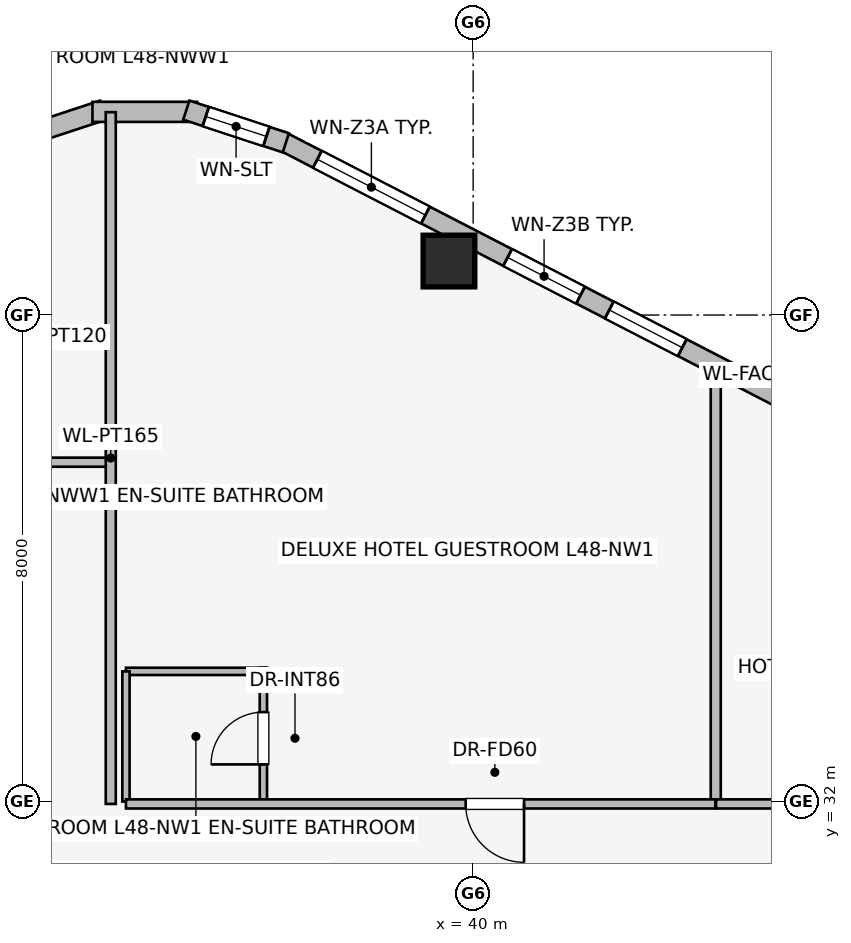
"""IFC4 building model, lengths in metres.
Left out: names, types, materials, properties, quantities, classifications, styles, units other than length and angle.
Written with IfcOpenShell. Run it as: python <this file> out.ifc"""

import sys

from ifc_helpers import new_model, si_unit, direction, frame, frame_2d, origin, origin_2d, place, context, subcontext, project, spatial, rectangle, extrude, element, fill, save


model = new_model("IFC4")
c1 = context("Model", 3, precision=1e-05, world=origin(), true_north=direction((0.0, 1.0)))
c2 = subcontext(c1, "Body", "Model", "MODEL_VIEW")
j1 = project(units=[si_unit("LENGTHUNIT", "METRE"), si_unit("PLANEANGLEUNIT", "RADIAN")], contexts=[c1])
p1 = place(None, origin())
s1 = spatial("IfcSite", under=j1, at=p1, CompositionType="ELEMENT")
p2 = place(p1, origin())
s2 = spatial("IfcBuilding", under=s1, at=p2, CompositionType="ELEMENT")
p3 = place(p2, frame((0.0, 0.0, 177.45)))
s3 = spatial("IfcBuildingStorey", under=s2, at=p3, CompositionType="ELEMENT", Elevation=177.45)
p4 = place(p3, frame((39.602, 40.888, 0.0), z_axis=(0.0, 0.0, 1.0), x_axis=(1.0, 0.0, 0.0)))
e1 = element("IfcColumn", 1, at=p4, inside=s3, PredefinedType="COLUMN", context=c2, shape_type="SweptSolid", body=[
    extrude(rectangle(XDim=0.85, YDim=0.85, at=origin_2d()), origin(), (0.0, 0.0, 1.0), 3.45),
])
p5 = place(p3, frame((36.838, 42.871, 0.0), z_axis=(0.0, 0.0, 1.0), x_axis=(0.888626188278, -0.458632202867, 0.0)))
e2 = element("IfcWall", 2, at=p5, inside=s3, PredefinedType="STANDARD", context=c2, shape_type="SweptSolid", body=[
    extrude(rectangle(XDim=16.828, YDim=0.31, at=frame_2d((8.414, 0.0))), origin(), (0.0, 0.0, 1.0), 3.16),
])
p6 = place(p5, frame((0.675, 0.0, 0.75)))
e3 = element("IfcOpeningElement", 3, at=p6, cuts=e2, PredefinedType="OPENING", context=c2, shape_type="SweptSolid", body=[
    extrude(rectangle(XDim=2.0, YDim=1.5, at=frame_2d((1.0, 0.75))), frame((0.0, 0.165, 0.0), z_axis=(0.0, -1.0, 0.0), x_axis=(1.0, 0.0, 0.0)), (0.0, 0.0, 1.0), 0.33),
])
p7 = place(p5, frame((4.196, 0.0, 0.75)))
e4 = element("IfcOpeningElement", 4, at=p7, cuts=e2, PredefinedType="OPENING", context=c2, shape_type="SweptSolid", body=[
    extrude(rectangle(XDim=1.35, YDim=1.45, at=frame_2d((0.675, 0.725))), frame((0.0, 0.165, 0.0), z_axis=(0.0, -1.0, 0.0), x_axis=(1.0, 0.0, 0.0)), (0.0, 0.0, 1.0), 0.33),
])
p8 = place(p5, frame((6.078, 0.0, 0.75)))
e5 = element("IfcOpeningElement", 5, at=p8, cuts=e2, PredefinedType="OPENING", context=c2, shape_type="SweptSolid", body=[
    extrude(rectangle(XDim=1.35, YDim=1.45, at=frame_2d((0.675, 0.725))), frame((0.0, 0.165, 0.0), z_axis=(0.0, -1.0, 0.0), x_axis=(1.0, 0.0, 0.0)), (0.0, 0.0, 1.0), 0.33),
])
p9 = place(p5, frame((9.658, 0.0, 0.75)))
e6 = element("IfcOpeningElement", 6, at=p9, cuts=e2, PredefinedType="OPENING", context=c2, shape_type="SweptSolid", body=[
    extrude(rectangle(XDim=2.0, YDim=1.5, at=frame_2d((1.0, 0.75))), frame((0.0, 0.165, 0.0), z_axis=(0.0, -1.0, 0.0), x_axis=(1.0, 0.0, 0.0)), (0.0, 0.0, 1.0), 0.33),
])
p10 = place(p5, frame((14.478, 0.0, 0.75)))
e7 = element("IfcOpeningElement", 7, at=p10, cuts=e2, PredefinedType="OPENING", context=c2, shape_type="SweptSolid", body=[
    extrude(rectangle(XDim=1.35, YDim=1.45, at=frame_2d((0.675, 0.725))), frame((0.0, 0.165, 0.0), z_axis=(0.0, -1.0, 0.0), x_axis=(1.0, 0.0, 0.0)), (0.0, 0.0, 1.0), 0.33),
])
p11 = place(p3, frame((32.281, 42.832, 0.0), z_axis=(0.0, 0.0, 1.0), x_axis=(0.949937416267, 0.312440242569, 0.0)))
e8 = element("IfcWall", 8, at=p11, inside=s3, PredefinedType="STANDARD", context=c2, shape_type="SweptSolid", body=[
    extrude(rectangle(XDim=1.722, YDim=0.33, at=frame_2d((0.861, 0.0))), origin(), (0.0, 0.0, 1.0), 3.16),
])
p12 = place(p3, frame((33.739, 43.341, 0.0), z_axis=(0.0, 0.0, 1.0), x_axis=(1.0, 0.0, 0.0)))
e9 = element("IfcWall", 9, at=p12, inside=s3, PredefinedType="STANDARD", context=c2, shape_type="SweptSolid", body=[
    extrude(rectangle(XDim=1.722, YDim=0.33, at=frame_2d((0.861, 0.0))), origin(), (0.0, 0.0, 1.0), 3.16),
])
p13 = place(p3, frame((35.283, 43.37, 0.0), z_axis=(0.0, 0.0, 1.0), x_axis=(0.949937416267, -0.312440242569, 0.0)))
e10 = element("IfcWall", 10, at=p13, inside=s3, PredefinedType="STANDARD", context=c2, shape_type="SweptSolid", body=[
    extrude(rectangle(XDim=1.722, YDim=0.33, at=frame_2d((0.861, 0.0))), origin(), (0.0, 0.0, 1.0), 3.16),
])
p14 = place(p13, frame((0.336, 0.0, 0.75)))
e11 = element("IfcOpeningElement", 11, at=p14, cuts=e10, PredefinedType="OPENING", context=c2, shape_type="SweptSolid", body=[
    extrude(rectangle(XDim=1.05, YDim=1.4, at=frame_2d((0.525, 0.7))), frame((0.0, 0.175, 0.0), z_axis=(0.0, -1.0, 0.0), x_axis=(1.0, 0.0, 0.0)), (0.0, 0.0, 1.0), 0.35),
])
p15 = place(p3, frame((34.0, 39.64, 0.0), z_axis=(0.0, 0.0, 1.0), x_axis=(-1.0, 0.0, 0.0)))
e12 = element("IfcWall", 12, at=p15, inside=s3, PredefinedType="PARTITIONING", context=c2, shape_type="SweptSolid", body=[
    extrude(rectangle(XDim=2.34, YDim=0.12, at=frame_2d((1.17, 0.0))), origin(), (0.0, 0.0, 1.0), 3.16),
])
p16 = place(p3, frame((34.0, 37.58, 0.0), z_axis=(0.0, 0.0, 1.0), x_axis=(-1.0, 0.0, 0.0)))
e13 = element("IfcWall", 13, at=p16, inside=s3, PredefinedType="PARTITIONING", context=c2, shape_type="SweptSolid", body=[
    extrude(rectangle(XDim=12.075, YDim=0.15, at=frame_2d((6.038, 0.0))), origin(), (0.0, 0.0, 1.0), 3.16),
])
p17 = place(p16, frame((4.96, 0.0, 0.0)))
e14 = element("IfcOpeningElement", 14, at=p17, cuts=e13, PredefinedType="OPENING", context=c2, shape_type="SweptSolid", body=[
    extrude(rectangle(XDim=0.96, YDim=2.0, at=frame_2d((0.48, 1.0))), frame((0.0, 0.085, 0.0), z_axis=(0.0, -1.0, 0.0), x_axis=(1.0, 0.0, 0.0)), (0.0, 0.0, 1.0), 0.17),
])
p18 = place(p3, frame((34.04, 31.96, 0.0), z_axis=(0.0, 0.0, 1.0), x_axis=(0.0, 1.0, 0.0)))
e15 = element("IfcWall", 15, at=p18, inside=s3, PredefinedType="PARTITIONING", context=c2, shape_type="SweptSolid", body=[
    extrude(rectangle(XDim=11.376, YDim=0.165, at=frame_2d((5.688, 0.0))), origin(), (0.0, 0.0, 1.0), 3.16),
])
p19 = place(p3, frame((43.99, 31.97, 0.0), z_axis=(0.0, 0.0, 1.0), x_axis=(0.0, 1.0, 0.0)))
e16 = element("IfcWall", 16, at=p19, inside=s3, PredefinedType="PARTITIONING", context=c2, shape_type="SweptSolid", body=[
    extrude(rectangle(XDim=7.193, YDim=0.165, at=frame_2d((3.597, 0.0))), origin(), (0.0, 0.0, 1.0), 3.16),
])
p20 = place(p3, frame((36.55, 31.96, 0.0), z_axis=(0.0, 0.0, 1.0), x_axis=(0.0, 1.0, 0.0)))
e17 = element("IfcWall", 17, at=p20, inside=s3, PredefinedType="PARTITIONING", context=c2, shape_type="SweptSolid", body=[
    extrude(rectangle(XDim=2.24, YDim=0.12, at=frame_2d((1.12, 0.0))), origin(), (0.0, 0.0, 1.0), 3.16),
])
p21 = place(p20, frame((0.65, 0.0, 0.0)))
e18 = element("IfcOpeningElement", 18, at=p21, cuts=e17, PredefinedType="OPENING", context=c2, shape_type="SweptSolid", body=[
    extrude(rectangle(XDim=0.86, YDim=2.0, at=frame_2d((0.43, 1.0))), frame((0.0, 0.07, 0.0), z_axis=(0.0, -1.0, 0.0), x_axis=(1.0, 0.0, 0.0)), (0.0, 0.0, 1.0), 0.14),
])
p22 = place(p3, frame((36.61, 34.14, 0.0), z_axis=(0.0, 0.0, 1.0), x_axis=(-1.0, 0.0, 0.0)))
e19 = element("IfcWall", 19, at=p22, inside=s3, PredefinedType="PARTITIONING", context=c2, shape_type="SweptSolid", body=[
    extrude(rectangle(XDim=2.32, YDim=0.12, at=frame_2d((1.16, 0.0))), origin(), (0.0, 0.0, 1.0), 3.16),
])
p23 = place(p3, frame((34.29, 34.14, 0.0), z_axis=(0.0, 0.0, 1.0), x_axis=(0.0, -1.0, 0.0)))
e20 = element("IfcWall", 20, at=p23, inside=s3, PredefinedType="PARTITIONING", context=c2, shape_type="SweptSolid", body=[
    extrude(rectangle(XDim=2.14, YDim=0.12, at=frame_2d((1.07, 0.0))), origin(), (0.0, 0.0, 1.0), 3.16),
])
p24 = place(p3, frame((43.985, 31.96, 0.0), z_axis=(0.0, 0.0, 1.0), x_axis=(-1.0, 0.0, 0.0)))
e21 = element("IfcWall", 21, at=p24, inside=s3, PredefinedType="PARTITIONING", context=c2, shape_type="SweptSolid", body=[
    extrude(rectangle(XDim=9.695, YDim=0.15, at=frame_2d((4.848, 0.0))), origin(), (0.0, 0.0, 1.0), 3.16),
])
p25 = place(p24, frame((3.148, 0.0, 0.0)))
e22 = element("IfcOpeningElement", 22, at=p25, cuts=e21, PredefinedType="OPENING", context=c2, shape_type="SweptSolid", body=[
    extrude(rectangle(XDim=0.96, YDim=2.0, at=frame_2d((0.48, 1.0))), frame((0.0, 0.085, 0.0), z_axis=(0.0, -1.0, 0.0), x_axis=(1.0, 0.0, 0.0)), (0.0, 0.0, 1.0), 0.17),
])
p26 = place(p3, frame((53.97, 31.96, 0.0), z_axis=(0.0, 0.0, 1.0), x_axis=(-1.0, 0.0, 0.0)))
e23 = element("IfcWall", 23, at=p26, inside=s3, PredefinedType="PARTITIONING", context=c2, shape_type="SweptSolid", body=[
    extrude(rectangle(XDim=9.975, YDim=0.15, at=frame_2d((4.987, 0.0))), origin(), (0.0, 0.0, 1.0), 3.16),
])
p27 = place(p26, frame((4.627, 0.0, 0.0)))
e24 = element("IfcOpeningElement", 24, at=p27, cuts=e23, PredefinedType="OPENING", context=c2, shape_type="SweptSolid", body=[
    extrude(rectangle(XDim=0.96, YDim=2.0, at=frame_2d((0.48, 1.0))), frame((0.0, 0.085, 0.0), z_axis=(0.0, -1.0, 0.0), x_axis=(1.0, 0.0, 0.0)), (0.0, 0.0, 1.0), 0.17),
])
p28 = place(p6, origin())
e25 = element("IfcWindow", 25, at=p28, inside=s3, PartitioningType="SINGLE_PANEL", PredefinedType="WINDOW", context=c2, shape_type="SweptSolid", body=[
    extrude(rectangle(XDim=2.0, YDim=1.5, at=frame_2d((1.0, 0.75))), frame((0.0, 0.03, 0.0), z_axis=(0.0, -1.0, 0.0), x_axis=(1.0, 0.0, 0.0)), (0.0, 0.0, 1.0), 0.06),
])
fill(e3, e25)
p29 = place(p7, origin())
e26 = element("IfcWindow", 26, at=p29, inside=s3, PartitioningType="SINGLE_PANEL", PredefinedType="WINDOW", context=c2, shape_type="SweptSolid", body=[
    extrude(rectangle(XDim=1.35, YDim=1.45, at=frame_2d((0.675, 0.725))), frame((0.0, 0.03, 0.0), z_axis=(0.0, -1.0, 0.0), x_axis=(1.0, 0.0, 0.0)), (0.0, 0.0, 1.0), 0.06),
])
fill(e4, e26)
p30 = place(p8, origin())
e27 = element("IfcWindow", 27, at=p30, inside=s3, PartitioningType="SINGLE_PANEL", PredefinedType="WINDOW", context=c2, shape_type="SweptSolid", body=[
    extrude(rectangle(XDim=1.35, YDim=1.45, at=frame_2d((0.675, 0.725))), frame((0.0, 0.03, 0.0), z_axis=(0.0, -1.0, 0.0), x_axis=(1.0, 0.0, 0.0)), (0.0, 0.0, 1.0), 0.06),
])
fill(e5, e27)
p31 = place(p14, origin())
e28 = element("IfcWindow", 28, at=p31, inside=s3, PartitioningType="SINGLE_PANEL", PredefinedType="WINDOW", context=c2, shape_type="SweptSolid", body=[
    extrude(rectangle(XDim=1.05, YDim=1.4, at=frame_2d((0.525, 0.7))), frame((0.0, 0.03, 0.0), z_axis=(0.0, -1.0, 0.0), x_axis=(1.0, 0.0, 0.0)), (0.0, 0.0, 1.0), 0.06),
])
fill(e11, e28)
p32 = place(p21, origin())
e29 = element("IfcDoor", 29, at=p32, inside=s3, OperationType="SINGLE_SWING_LEFT", PredefinedType="DOOR", context=c2, shape_type="SweptSolid", body=[
    extrude(rectangle(XDim=0.86, YDim=2.0, at=frame_2d((0.43, 1.0))), frame((0.0, 0.025, 0.0), z_axis=(0.0, -1.0, 0.0), x_axis=(1.0, 0.0, 0.0)), (0.0, 0.0, 1.0), 0.05),
])
fill(e18, e29)
p33 = place(p25, origin())
e30 = element("IfcDoor", 30, at=p33, inside=s3, OperationType="SINGLE_SWING_LEFT", PredefinedType="DOOR", context=c2, shape_type="SweptSolid", body=[
    extrude(rectangle(XDim=0.96, YDim=2.0, at=frame_2d((0.48, 1.0))), frame((0.0, 0.025, 0.0), z_axis=(0.0, -1.0, 0.0), x_axis=(1.0, 0.0, 0.0)), (0.0, 0.0, 1.0), 0.05),
])
fill(e22, e30)
save(model, sys.argv[1])
